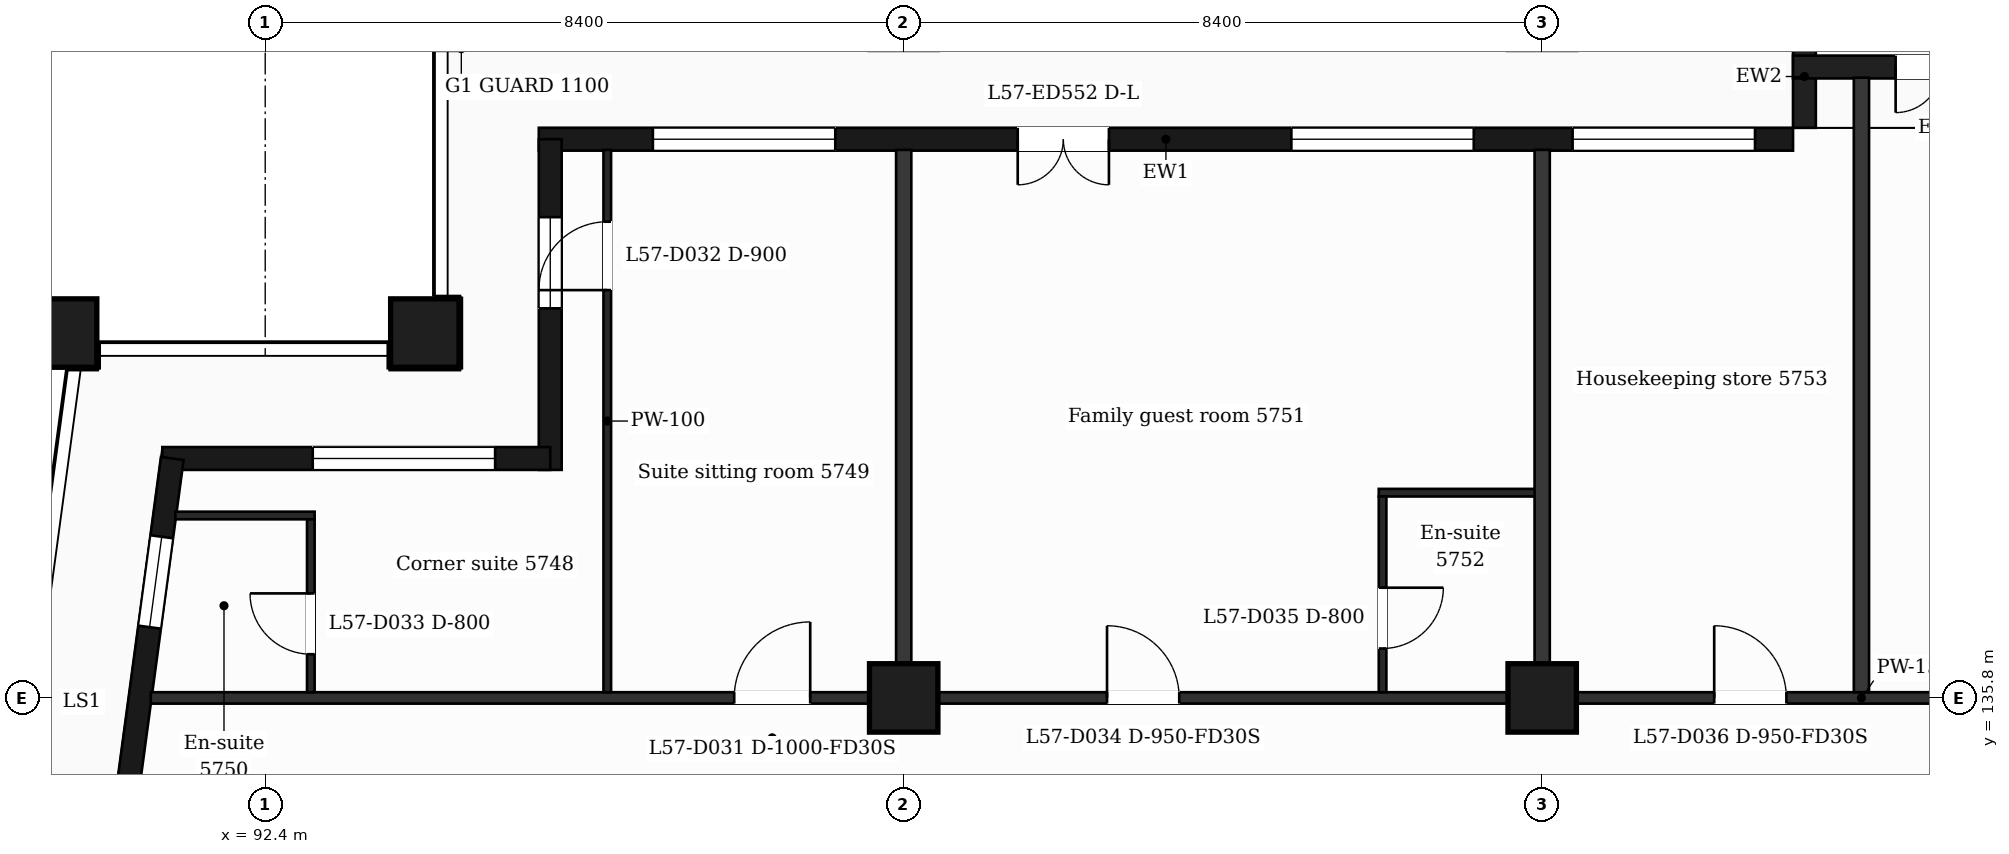
"""IFC4 building model, lengths in metres.
Left out: names, types, materials, properties, quantities, classifications, styles, units other than length and angle.
Written with IfcOpenShell. Run it as: python <this file> out.ifc"""

import sys

from ifc_helpers import new_model, si_unit, direction, frame, frame_2d, origin, origin_2d, place, context, subcontext, project, spatial, rectangle, extrude, element, fill, save


model = new_model("IFC4")
c1 = context("Model", 3, precision=1e-05, world=origin(), true_north=direction((0.0, 1.0)))
c2 = subcontext(c1, "Body", "Model", "MODEL_VIEW")
j1 = project(units=[si_unit("LENGTHUNIT", "METRE"), si_unit("PLANEANGLEUNIT", "RADIAN")], contexts=[c1])
p1 = place(None, origin())
s1 = spatial("IfcSite", under=j1, at=p1, CompositionType="ELEMENT")
p2 = place(p1, origin())
s2 = spatial("IfcBuilding", under=s1, at=p2, CompositionType="ELEMENT")
p3 = place(p2, frame((0.0, 0.0, 235.5)))
s3 = spatial("IfcBuildingStorey", under=s2, at=p3, CompositionType="ELEMENT", Elevation=235.5)
for number, where, z_axis, x_axis in (
    (1, (94.5, 140.6, 0.0), (0.0, 0.0, 1.0), (1.0, 0.0, 0.0)),
    (2, (89.735, 140.6, 0.0), (0.0, 0.0, 1.0), (1.0, 0.0, 0.0)),
    (3, (100.8, 135.8, 0.0), (0.0, 0.0, 1.0), (1.0, 0.0, 0.0)),
    (4, (109.2, 135.8, 0.0), (0.0, 0.0, 1.0), (1.0, 0.0, 0.0)),
):
    element("IfcColumn", number, at=place(p3, frame(where, z_axis=z_axis, x_axis=x_axis)), inside=s3, PredefinedType="COLUMN", context=c2, shape_type="SweptSolid", body=[
        extrude(rectangle(XDim=0.9, YDim=0.9, at=origin_2d()), origin(), (0.0, 0.0, 1.0), 3.7),
    ])
p4 = place(p3, frame((112.5, 143.15, 0.0), z_axis=(0.0, 0.0, 1.0), x_axis=(-1.0, 0.0, 0.0)))
e5 = element("IfcWall", 5, at=p4, inside=s3, PredefinedType="SOLIDWALL", context=c2, shape_type="SweptSolid", body=[
    extrude(rectangle(XDim=16.5, YDim=0.3, at=frame_2d((8.25, 0.0))), origin(), (0.0, 0.0, 1.0), 3.38),
])
p5 = place(p4, frame((0.5, 0.0, 0.9)))
e6 = element("IfcOpeningElement", 6, at=p5, cuts=e5, PredefinedType="OPENING", context=c2, shape_type="SweptSolid", body=[
    extrude(rectangle(XDim=2.4, YDim=2.1, at=frame_2d((1.2, 1.05))), frame((0.0, 0.16, 0.0), z_axis=(0.0, -1.0, 0.0), x_axis=(1.0, 0.0, 0.0)), (0.0, 0.0, 1.0), 0.32),
])
p6 = place(p4, frame((4.2, 0.0, 0.9)))
e7 = element("IfcOpeningElement", 7, at=p6, cuts=e5, PredefinedType="OPENING", context=c2, shape_type="SweptSolid", body=[
    extrude(rectangle(XDim=2.4, YDim=2.1, at=frame_2d((1.2, 1.05))), frame((0.0, 0.16, 0.0), z_axis=(0.0, -1.0, 0.0), x_axis=(1.0, 0.0, 0.0)), (0.0, 0.0, 1.0), 0.32),
])
p7 = place(p4, frame((9.0, 0.0, 0.0)))
e8 = element("IfcOpeningElement", 8, at=p7, cuts=e5, PredefinedType="OPENING", context=c2, shape_type="SweptSolid", body=[
    extrude(rectangle(XDim=1.2, YDim=2.4, at=frame_2d((0.6, 1.2))), frame((0.0, 0.16, 0.0), z_axis=(0.0, -1.0, 0.0), x_axis=(1.0, 0.0, 0.0)), (0.0, 0.0, 1.0), 0.32),
])
p8 = place(p4, frame((12.6, 0.0, 0.9)))
e9 = element("IfcOpeningElement", 9, at=p8, cuts=e5, PredefinedType="OPENING", context=c2, shape_type="SweptSolid", body=[
    extrude(rectangle(XDim=2.4, YDim=2.1, at=frame_2d((1.2, 1.05))), frame((0.0, 0.16, 0.0), z_axis=(0.0, -1.0, 0.0), x_axis=(1.0, 0.0, 0.0)), (0.0, 0.0, 1.0), 0.32),
])
p9 = place(p3, frame((112.65, 143.3, 0.0), z_axis=(0.0, 0.0, 1.0), x_axis=(0.0, 1.0, 0.0)))
e10 = element("IfcWall", 10, at=p9, inside=s3, PredefinedType="SOLIDWALL", context=c2, shape_type="SweptSolid", body=[
    extrude(rectangle(XDim=1.35, YDim=0.3, at=frame_2d((0.675, 0.0))), origin(), (0.0, 0.0, 1.0), 3.38),
])
p10 = place(p3, frame((116.4, 144.1, 0.0), z_axis=(0.0, 0.0, 1.0), x_axis=(-1.0, 0.0, 0.0)))
e11 = element("IfcWall", 11, at=p10, inside=s3, PredefinedType="SOLIDWALL", context=c2, shape_type="SweptSolid", body=[
    extrude(rectangle(XDim=3.9, YDim=0.3, at=frame_2d((1.95, 0.0))), origin(), (0.0, 0.0, 1.0), 3.38),
])
p11 = place(p10, frame((1.35, 0.0, 0.0)))
e12 = element("IfcOpeningElement", 12, at=p11, cuts=e11, PredefinedType="OPENING", context=c2, shape_type="SweptSolid", body=[
    extrude(rectangle(XDim=1.2, YDim=2.4, at=frame_2d((0.6, 1.2))), frame((0.0, 0.16, 0.0), z_axis=(0.0, -1.0, 0.0), x_axis=(1.0, 0.0, 0.0)), (0.0, 0.0, 1.0), 0.32),
])
p12 = place(p3, frame((96.15, 143.15, 0.0), z_axis=(0.0, 0.0, 1.0), x_axis=(0.0, -1.0, 0.0)))
e13 = element("IfcWall", 13, at=p12, inside=s3, PredefinedType="SOLIDWALL", context=c2, shape_type="SweptSolid", body=[
    extrude(rectangle(XDim=4.35, YDim=0.3, at=frame_2d((2.175, 0.0))), origin(), (0.0, 0.0, 1.0), 3.38),
])
p13 = place(p12, frame((1.025, 0.0, 0.9)))
e14 = element("IfcOpeningElement", 14, at=p13, cuts=e13, PredefinedType="OPENING", context=c2, shape_type="SweptSolid", body=[
    extrude(rectangle(XDim=1.2, YDim=2.1, at=frame_2d((0.6, 1.05))), frame((0.0, 0.16, 0.0), z_axis=(0.0, -1.0, 0.0), x_axis=(1.0, 0.0, 0.0)), (0.0, 0.0, 1.0), 0.32),
])
p14 = place(p3, frame((96.15, 138.95, 0.0), z_axis=(0.0, 0.0, 1.0), x_axis=(-1.0, 0.0, 0.0)))
e15 = element("IfcWall", 15, at=p14, inside=s3, PredefinedType="SOLIDWALL", context=c2, shape_type="SweptSolid", body=[
    extrude(rectangle(XDim=5.104, YDim=0.3, at=frame_2d((2.552, 0.0))), origin(), (0.0, 0.0, 1.0), 3.38),
])
p15 = place(p14, frame((0.725, 0.0, 0.9)))
e16 = element("IfcOpeningElement", 16, at=p15, cuts=e15, PredefinedType="OPENING", context=c2, shape_type="SweptSolid", body=[
    extrude(rectangle(XDim=2.4, YDim=2.1, at=frame_2d((1.2, 1.05))), frame((0.0, 0.16, 0.0), z_axis=(0.0, -1.0, 0.0), x_axis=(1.0, 0.0, 0.0)), (0.0, 0.0, 1.0), 0.32),
])
p16 = place(p3, frame((91.177, 138.95, 0.0), z_axis=(0.0, 0.0, 1.0), x_axis=(-0.133426664613, -0.991058689065, 0.0)))
e17 = element("IfcWall", 17, at=p16, inside=s3, PredefinedType="SOLIDWALL", context=c2, shape_type="SweptSolid", body=[
    extrude(rectangle(XDim=6.609, YDim=0.3, at=frame_2d((3.305, 0.0))), origin(), (0.0, 0.0, 1.0), 3.38),
])
p17 = place(p16, frame((1.039, 0.0, 0.9)))
e18 = element("IfcOpeningElement", 18, at=p17, cuts=e17, PredefinedType="OPENING", context=c2, shape_type="SweptSolid", body=[
    extrude(rectangle(XDim=1.2, YDim=2.1, at=frame_2d((0.6, 1.05))), frame((0.0, 0.16, 0.0), z_axis=(0.0, -1.0, 0.0), x_axis=(1.0, 0.0, 0.0)), (0.0, 0.0, 1.0), 0.32),
])
p18 = place(p16, frame((4.294, 0.0, 0.0)))
e19 = element("IfcOpeningElement", 19, at=p18, cuts=e17, PredefinedType="OPENING", context=c2, shape_type="SweptSolid", body=[
    extrude(rectangle(XDim=1.2, YDim=2.4, at=frame_2d((0.6, 1.2))), frame((0.0, 0.16, 0.0), z_axis=(0.0, -1.0, 0.0), x_axis=(1.0, 0.0, 0.0)), (0.0, 0.0, 1.0), 0.32),
])
p19 = place(p3, frame((90.895, 135.8, 0.0), z_axis=(0.0, 0.0, 1.0), x_axis=(1.0, 0.0, 0.0)))
e20 = element("IfcWall", 20, at=p19, inside=s3, PredefinedType="PARTITIONING", context=c2, shape_type="SweptSolid", body=[
    extrude(rectangle(XDim=45.011, YDim=0.15, at=frame_2d((22.505, 0.0))), origin(), (0.0, 0.0, 1.0), 3.38),
])
p20 = place(p19, frame((7.675, 0.0, 0.0)))
e21 = element("IfcOpeningElement", 21, at=p20, cuts=e20, PredefinedType="OPENING", context=c2, shape_type="SweptSolid", body=[
    extrude(rectangle(XDim=1.0, YDim=2.1, at=frame_2d((0.5, 1.05))), frame((0.0, 0.085, 0.0), z_axis=(0.0, -1.0, 0.0), x_axis=(1.0, 0.0, 0.0)), (0.0, 0.0, 1.0), 0.17),
])
p21 = place(p19, frame((12.58, 0.0, 0.0)))
e22 = element("IfcOpeningElement", 22, at=p21, cuts=e20, PredefinedType="OPENING", context=c2, shape_type="SweptSolid", body=[
    extrude(rectangle(XDim=0.95, YDim=2.1, at=frame_2d((0.475, 1.05))), frame((0.0, 0.085, 0.0), z_axis=(0.0, -1.0, 0.0), x_axis=(1.0, 0.0, 0.0)), (0.0, 0.0, 1.0), 0.17),
])
p22 = place(p19, frame((20.568, 0.0, 0.0)))
e23 = element("IfcOpeningElement", 23, at=p22, cuts=e20, PredefinedType="OPENING", context=c2, shape_type="SweptSolid", body=[
    extrude(rectangle(XDim=0.95, YDim=2.1, at=frame_2d((0.475, 1.05))), frame((0.0, 0.085, 0.0), z_axis=(0.0, -1.0, 0.0), x_axis=(1.0, 0.0, 0.0)), (0.0, 0.0, 1.0), 0.17),
])
p23 = place(p19, frame((24.865, 0.0, 0.0)))
e24 = element("IfcOpeningElement", 24, at=p23, cuts=e20, PredefinedType="OPENING", context=c2, shape_type="SweptSolid", body=[
    extrude(rectangle(XDim=1.0, YDim=2.1, at=frame_2d((0.5, 1.05))), frame((0.0, 0.085, 0.0), z_axis=(0.0, -1.0, 0.0), x_axis=(1.0, 0.0, 0.0)), (0.0, 0.0, 1.0), 0.17),
])
p24 = place(p19, frame((37.195, 0.0, 0.0)))
e25 = element("IfcOpeningElement", 25, at=p24, cuts=e20, PredefinedType="OPENING", context=c2, shape_type="SweptSolid", body=[
    extrude(rectangle(XDim=1.0, YDim=2.1, at=frame_2d((0.5, 1.05))), frame((0.0, 0.085, 0.0), z_axis=(0.0, -1.0, 0.0), x_axis=(1.0, 0.0, 0.0)), (0.0, 0.0, 1.0), 0.17),
])
p25 = place(p3, frame((91.218, 138.2, 0.0), z_axis=(0.0, 0.0, 1.0), x_axis=(1.0, 0.0, 0.0)))
e26 = element("IfcWall", 26, at=p25, inside=s3, PredefinedType="PARTITIONING", context=c2, shape_type="SweptSolid", body=[
    extrude(rectangle(XDim=1.832, YDim=0.1, at=frame_2d((0.916, 0.0))), origin(), (0.0, 0.0, 1.0), 3.38),
])
p26 = place(p3, frame((107.05, 138.5, 0.0), z_axis=(0.0, 0.0, 1.0), x_axis=(1.0, 0.0, 0.0)))
e27 = element("IfcWall", 27, at=p26, inside=s3, PredefinedType="PARTITIONING", context=c2, shape_type="SweptSolid", body=[
    extrude(rectangle(XDim=2.15, YDim=0.1, at=frame_2d((1.075, 0.0))), origin(), (0.0, 0.0, 1.0), 3.38),
])
p27 = place(p3, frame((93.0, 135.875, 0.0), z_axis=(0.0, 0.0, 1.0), x_axis=(0.0, 1.0, 0.0)))
e28 = element("IfcWall", 28, at=p27, inside=s3, PredefinedType="PARTITIONING", context=c2, shape_type="SweptSolid", body=[
    extrude(rectangle(XDim=2.275, YDim=0.1, at=frame_2d((1.137, 0.0))), origin(), (0.0, 0.0, 1.0), 3.38),
])
p28 = place(p27, frame((0.5, 0.0, 0.0)))
e29 = element("IfcOpeningElement", 29, at=p28, cuts=e28, PredefinedType="OPENING", context=c2, shape_type="SweptSolid", body=[
    extrude(rectangle(XDim=0.8, YDim=2.1, at=frame_2d((0.4, 1.05))), frame((0.0, 0.06, 0.0), z_axis=(0.0, -1.0, 0.0), x_axis=(1.0, 0.0, 0.0)), (0.0, 0.0, 1.0), 0.12),
])
p29 = place(p3, frame((96.9, 135.875, 0.0), z_axis=(0.0, 0.0, 1.0), x_axis=(0.0, 1.0, 0.0)))
e30 = element("IfcWall", 30, at=p29, inside=s3, PredefinedType="PARTITIONING", context=c2, shape_type="SweptSolid", body=[
    extrude(rectangle(XDim=7.135, YDim=0.1, at=frame_2d((3.567, 0.0))), origin(), (0.0, 0.0, 1.0), 3.38),
])
p30 = place(p29, frame((5.29, 0.0, 0.0)))
e31 = element("IfcOpeningElement", 31, at=p30, cuts=e30, PredefinedType="OPENING", context=c2, shape_type="SweptSolid", body=[
    extrude(rectangle(XDim=0.9, YDim=2.1, at=frame_2d((0.45, 1.05))), frame((0.0, 0.06, 0.0), z_axis=(0.0, -1.0, 0.0), x_axis=(1.0, 0.0, 0.0)), (0.0, 0.0, 1.0), 0.12),
])
p31 = place(p3, frame((100.8, 135.875, 0.0), z_axis=(0.0, 0.0, 1.0), x_axis=(0.0, 1.0, 0.0)))
e32 = element("IfcWall", 32, at=p31, inside=s3, PredefinedType="PARTITIONING", context=c2, shape_type="SweptSolid", body=[
    extrude(rectangle(XDim=7.135, YDim=0.2, at=frame_2d((3.567, 0.0))), origin(), (0.0, 0.0, 1.0), 3.38),
])
p32 = place(p3, frame((107.1, 135.875, 0.0), z_axis=(0.0, 0.0, 1.0), x_axis=(0.0, 1.0, 0.0)))
e33 = element("IfcWall", 33, at=p32, inside=s3, PredefinedType="PARTITIONING", context=c2, shape_type="SweptSolid", body=[
    extrude(rectangle(XDim=2.575, YDim=0.1, at=frame_2d((1.288, 0.0))), origin(), (0.0, 0.0, 1.0), 3.38),
])
p33 = place(p32, frame((0.575, 0.0, 0.0)))
e34 = element("IfcOpeningElement", 34, at=p33, cuts=e33, PredefinedType="OPENING", context=c2, shape_type="SweptSolid", body=[
    extrude(rectangle(XDim=0.8, YDim=2.1, at=frame_2d((0.4, 1.05))), frame((0.0, 0.06, 0.0), z_axis=(0.0, -1.0, 0.0), x_axis=(1.0, 0.0, 0.0)), (0.0, 0.0, 1.0), 0.12),
])
p34 = place(p3, frame((109.2, 135.875, 0.0), z_axis=(0.0, 0.0, 1.0), x_axis=(0.0, 1.0, 0.0)))
e35 = element("IfcWall", 35, at=p34, inside=s3, PredefinedType="PARTITIONING", context=c2, shape_type="SweptSolid", body=[
    extrude(rectangle(XDim=7.135, YDim=0.2, at=frame_2d((3.567, 0.0))), origin(), (0.0, 0.0, 1.0), 3.38),
])
p35 = place(p3, frame((113.4, 135.875, 0.0), z_axis=(0.0, 0.0, 1.0), x_axis=(0.0, 1.0, 0.0)))
e36 = element("IfcWall", 36, at=p35, inside=s3, PredefinedType="PARTITIONING", context=c2, shape_type="SweptSolid", body=[
    extrude(rectangle(XDim=8.085, YDim=0.2, at=frame_2d((4.042, 0.0))), origin(), (0.0, 0.0, 1.0), 3.38),
])
p36 = place(p5, origin())
e37 = element("IfcWindow", 37, at=p36, inside=s3, PartitioningType="SINGLE_PANEL", PredefinedType="WINDOW", context=c2, shape_type="SweptSolid", body=[
    extrude(rectangle(XDim=2.4, YDim=2.1, at=frame_2d((1.2, 1.05))), frame((0.0, 0.03, 0.0), z_axis=(0.0, -1.0, 0.0), x_axis=(1.0, 0.0, 0.0)), (0.0, 0.0, 1.0), 0.06),
])
fill(e6, e37)
p37 = place(p6, origin())
e38 = element("IfcWindow", 38, at=p37, inside=s3, PartitioningType="SINGLE_PANEL", PredefinedType="WINDOW", context=c2, shape_type="SweptSolid", body=[
    extrude(rectangle(XDim=2.4, YDim=2.1, at=frame_2d((1.2, 1.05))), frame((0.0, 0.03, 0.0), z_axis=(0.0, -1.0, 0.0), x_axis=(1.0, 0.0, 0.0)), (0.0, 0.0, 1.0), 0.06),
])
fill(e7, e38)
p38 = place(p7, origin())
e39 = element("IfcDoor", 39, at=p38, inside=s3, OperationType="DOUBLE_DOOR_SINGLE_SWING", PredefinedType="DOOR", context=c2, shape_type="SweptSolid", body=[
    extrude(rectangle(XDim=1.2, YDim=2.4, at=frame_2d((0.6, 1.2))), frame((0.0, 0.025, 0.0), z_axis=(0.0, -1.0, 0.0), x_axis=(1.0, 0.0, 0.0)), (0.0, 0.0, 1.0), 0.05),
])
fill(e8, e39)
p39 = place(p8, origin())
e40 = element("IfcWindow", 40, at=p39, inside=s3, PartitioningType="SINGLE_PANEL", PredefinedType="WINDOW", context=c2, shape_type="SweptSolid", body=[
    extrude(rectangle(XDim=2.4, YDim=2.1, at=frame_2d((1.2, 1.05))), frame((0.0, 0.03, 0.0), z_axis=(0.0, -1.0, 0.0), x_axis=(1.0, 0.0, 0.0)), (0.0, 0.0, 1.0), 0.06),
])
fill(e9, e40)
p40 = place(p11, origin())
e41 = element("IfcDoor", 41, at=p40, inside=s3, OperationType="DOUBLE_DOOR_SINGLE_SWING", PredefinedType="DOOR", context=c2, shape_type="SweptSolid", body=[
    extrude(rectangle(XDim=1.2, YDim=2.4, at=frame_2d((0.6, 1.2))), frame((0.0, 0.025, 0.0), z_axis=(0.0, -1.0, 0.0), x_axis=(1.0, 0.0, 0.0)), (0.0, 0.0, 1.0), 0.05),
])
fill(e12, e41)
p41 = place(p13, origin())
e42 = element("IfcWindow", 42, at=p41, inside=s3, PartitioningType="SINGLE_PANEL", PredefinedType="WINDOW", context=c2, shape_type="SweptSolid", body=[
    extrude(rectangle(XDim=1.2, YDim=2.1, at=frame_2d((0.6, 1.05))), frame((0.0, 0.03, 0.0), z_axis=(0.0, -1.0, 0.0), x_axis=(1.0, 0.0, 0.0)), (0.0, 0.0, 1.0), 0.06),
])
fill(e14, e42)
p42 = place(p15, origin())
e43 = element("IfcWindow", 43, at=p42, inside=s3, PartitioningType="SINGLE_PANEL", PredefinedType="WINDOW", context=c2, shape_type="SweptSolid", body=[
    extrude(rectangle(XDim=2.4, YDim=2.1, at=frame_2d((1.2, 1.05))), frame((0.0, 0.03, 0.0), z_axis=(0.0, -1.0, 0.0), x_axis=(1.0, 0.0, 0.0)), (0.0, 0.0, 1.0), 0.06),
])
fill(e16, e43)
p43 = place(p17, origin())
e44 = element("IfcWindow", 44, at=p43, inside=s3, PartitioningType="SINGLE_PANEL", PredefinedType="WINDOW", context=c2, shape_type="SweptSolid", body=[
    extrude(rectangle(XDim=1.2, YDim=2.1, at=frame_2d((0.6, 1.05))), frame((0.0, 0.03, 0.0), z_axis=(0.0, -1.0, 0.0), x_axis=(1.0, 0.0, 0.0)), (0.0, 0.0, 1.0), 0.06),
])
fill(e18, e44)
p44 = place(p20, origin())
e45 = element("IfcDoor", 45, at=p44, inside=s3, OperationType="SINGLE_SWING_RIGHT", PredefinedType="DOOR", context=c2, shape_type="SweptSolid", body=[
    extrude(rectangle(XDim=1.0, YDim=2.1, at=frame_2d((0.5, 1.05))), frame((0.0, 0.025, 0.0), z_axis=(0.0, -1.0, 0.0), x_axis=(1.0, 0.0, 0.0)), (0.0, 0.0, 1.0), 0.05),
])
fill(e21, e45)
p45 = place(p30, origin())
e46 = element("IfcDoor", 46, at=p45, inside=s3, OperationType="SINGLE_SWING_LEFT", PredefinedType="DOOR", context=c2, shape_type="SweptSolid", body=[
    extrude(rectangle(XDim=0.9, YDim=2.1, at=frame_2d((0.45, 1.05))), frame((0.0, 0.025, 0.0), z_axis=(0.0, -1.0, 0.0), x_axis=(1.0, 0.0, 0.0)), (0.0, 0.0, 1.0), 0.05),
])
fill(e31, e46)
p46 = place(p28, origin())
e47 = element("IfcDoor", 47, at=p46, inside=s3, OperationType="SINGLE_SWING_RIGHT", PredefinedType="DOOR", context=c2, shape_type="SweptSolid", body=[
    extrude(rectangle(XDim=0.8, YDim=2.1, at=frame_2d((0.4, 1.05))), frame((0.0, 0.025, 0.0), z_axis=(0.0, -1.0, 0.0), x_axis=(1.0, 0.0, 0.0)), (0.0, 0.0, 1.0), 0.05),
])
fill(e29, e47)
p47 = place(p21, origin())
e48 = element("IfcDoor", 48, at=p47, inside=s3, OperationType="SINGLE_SWING_LEFT", PredefinedType="DOOR", context=c2, shape_type="SweptSolid", body=[
    extrude(rectangle(XDim=0.95, YDim=2.1, at=frame_2d((0.475, 1.05))), frame((0.0, 0.025, 0.0), z_axis=(0.0, -1.0, 0.0), x_axis=(1.0, 0.0, 0.0)), (0.0, 0.0, 1.0), 0.05),
])
fill(e22, e48)
p48 = place(p33, origin())
e49 = element("IfcDoor", 49, at=p48, inside=s3, OperationType="SINGLE_SWING_RIGHT", PredefinedType="DOOR", context=c2, shape_type="SweptSolid", body=[
    extrude(rectangle(XDim=0.8, YDim=2.1, at=frame_2d((0.4, 1.05))), frame((0.0, 0.025, 0.0), z_axis=(0.0, -1.0, 0.0), x_axis=(1.0, 0.0, 0.0)), (0.0, 0.0, 1.0), 0.05),
])
fill(e34, e49)
p49 = place(p22, origin())
e50 = element("IfcDoor", 50, at=p49, inside=s3, OperationType="SINGLE_SWING_LEFT", PredefinedType="DOOR", context=c2, shape_type="SweptSolid", body=[
    extrude(rectangle(XDim=0.95, YDim=2.1, at=frame_2d((0.475, 1.05))), frame((0.0, 0.025, 0.0), z_axis=(0.0, -1.0, 0.0), x_axis=(1.0, 0.0, 0.0)), (0.0, 0.0, 1.0), 0.05),
])
fill(e23, e50)
save(model, sys.argv[1])
